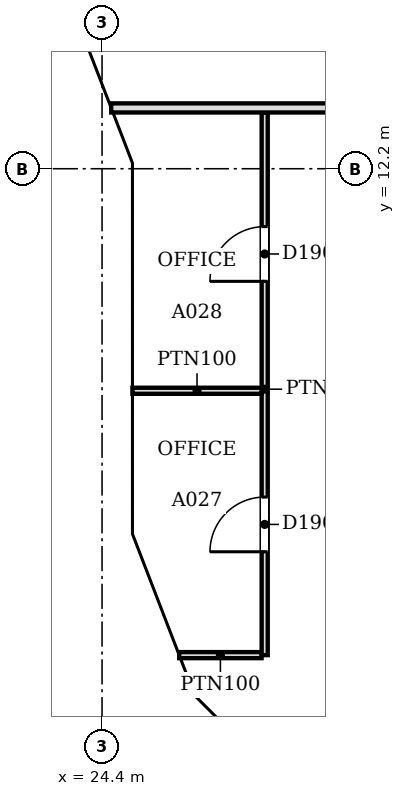
"""IFC4 building model, lengths in metres.
Left out: names, types, materials, properties, quantities, classifications, styles, units other than length and angle.
Written with IfcOpenShell. Run it as: python <this file> out.ifc"""

import sys

from ifc_helpers import new_model, si_unit, direction, frame, frame_2d, origin, place, context, subcontext, project, spatial, polyline, rectangle, outline, extrude, faceted_brep, source, transform, mapped, element, fill, save


model = new_model("IFC4")
c1 = context("Model", 3, precision=1e-05, world=origin(), true_north=direction((0.0, 1.0)))
c2 = subcontext(c1, "Body", "Model", "MODEL_VIEW")
j1 = project(units=[si_unit("LENGTHUNIT", "METRE"), si_unit("PLANEANGLEUNIT", "RADIAN")], contexts=[c1])
p1 = place(None, origin())
s1 = spatial("IfcSite", under=j1, at=p1, CompositionType="ELEMENT")
p2 = place(p1, origin())
s2 = spatial("IfcBuilding", under=s1, at=p2, CompositionType="ELEMENT")
p3 = place(p2, frame((0.0, 0.0, 72.4)))
s3 = spatial("IfcBuildingStorey", under=s2, at=p3, CompositionType="ELEMENT", Elevation=72.4)
m1 = source(origin(), c2, "Body", "Brep", [
    faceted_brep([(3.103, -0.25, 7.544), (0.053, -0.25, 3.864), (0.053, -0.25, 3.736), (3.103, -0.25, 0.056), (0.0, 0.25, 3.8), (3.149, 0.25, 7.6), (3.196, 0.25, 7.543), (3.196, 0.25, 0.057), (3.149, 0.25, 0.0), (3.149, -0.0, 0.0), (3.149, -0.0, 7.6), (0.0, 0.0, 3.8)], [[[0, 1, 2, 3]], [[4, 5, 6, 7, 8]], [[8, 7, 9]], [[6, 5, 10]], [[5, 4, 11, 1, 0, 10]], [[4, 8, 9, 3, 2, 11]], [[11, 2, 1]], [[3, 9, 7, 6, 10, 0]]]),
])
p4 = place(p3, frame((23.517, 15.185, -3.8), z_axis=(0.0, 0.0, 1.0), x_axis=(0.359864468756, -0.933004589553, 0.0)))
e1 = element("IfcWall", 1, at=p4, inside=s3, PredefinedType="SOLIDWALL", context=c2, shape_type="MappedRepresentation", body=[
    mapped(m1, transform((0.0, 0.0, 0.0), scale=1.0)),
])
m2 = source(origin(), c2, "Body", "SweptSolid", [
    extrude(outline(polyline([(2.949, 6.967), (0.325, 3.8), (2.949, 0.633), (2.949, 6.967)])), frame((0.0, 0.26, 0.0), z_axis=(0.0, -1.0, 0.0), x_axis=(1.0, 0.0, 0.0)), (0.0, 0.0, 1.0), 0.52),
])
p5 = place(p4, origin())
e2 = element("IfcOpeningElement", 2, at=p5, cuts=e1, PredefinedType="OPENING", context=c2, shape_type="MappedRepresentation", body=[
    mapped(m2, transform((0.0, 0.0, 0.0), scale=1.0)),
])
m3 = source(origin(), c2, "Body", "Brep", [
    faceted_brep([(0.093, -0.25, 0.057), (3.143, -0.25, 3.8), (0.093, -0.25, 7.543), (0.0, 0.25, 7.544), (0.047, 0.25, 7.6), (3.143, 0.25, 3.8), (0.047, 0.25, 0.0), (0.0, 0.25, 0.056), (0.047, 0.0, 0.0), (0.047, 0.0, 7.6)], [[[0, 1, 2]], [[3, 4, 5, 6, 7]], [[6, 5, 1, 0, 8]], [[5, 4, 9, 2, 1]], [[4, 3, 9]], [[7, 6, 8]], [[7, 8, 0, 2, 9, 3]]]),
])
p6 = place(p3, frame((24.65, 12.293, -3.8), z_axis=(0.0, 0.0, 1.0), x_axis=(0.0, -1.0, 0.0)))
e3 = element("IfcWall", 3, at=p6, inside=s3, PredefinedType="SOLIDWALL", context=c2, shape_type="MappedRepresentation", body=[
    mapped(m3, transform((0.0, 0.0, 0.0), scale=1.0)),
])
m4 = source(origin(), c2, "Body", "SweptSolid", [
    extrude(outline(polyline([(0.247, 0.641), (2.821, 3.8), (0.247, 6.959), (0.247, 0.641)])), frame((0.0, 0.26, 0.0), z_axis=(0.0, -1.0, 0.0), x_axis=(1.0, 0.0, 0.0)), (0.0, 0.0, 1.0), 0.52),
])
p7 = place(p6, origin())
e4 = element("IfcOpeningElement", 4, at=p7, cuts=e3, PredefinedType="OPENING", context=c2, shape_type="MappedRepresentation", body=[
    mapped(m4, transform((0.0, 0.0, 0.0), scale=1.0)),
])
m5 = source(origin(), c2, "Body", "Brep", [
    faceted_brep([(3.003, -0.25, 0.0), (3.05, -0.25, 0.06), (3.05, -0.25, 7.54), (3.003, -0.25, 7.6), (0.0, -0.25, 3.8), (0.0, 0.25, 3.8), (2.957, 0.25, 7.541), (2.957, 0.25, 0.059), (3.003, 0.0, 0.0), (3.003, 0.0, 7.6)], [[[0, 1, 2, 3, 4]], [[5, 6, 7]], [[1, 0, 8]], [[9, 3, 2]], [[6, 5, 4, 3, 9]], [[5, 7, 8, 0, 4]], [[1, 8, 7, 6, 9, 2]]]),
])
p8 = place(p3, frame((24.65, 9.15, -3.8), z_axis=(0.0, 0.0, 1.0), x_axis=(0.0, -1.0, 0.0)))
e5 = element("IfcWall", 5, at=p8, inside=s3, PredefinedType="SOLIDWALL", context=c2, shape_type="MappedRepresentation", body=[
    mapped(m5, transform((0.0, 0.0, 0.0), scale=1.0)),
])
m6 = source(origin(), c2, "Body", "SweptSolid", [
    extrude(outline(polyline([(2.803, 6.944), (0.319, 3.8), (2.803, 0.656), (2.803, 6.944)])), frame((0.0, 0.26, 0.0), z_axis=(0.0, -1.0, 0.0), x_axis=(1.0, 0.0, 0.0)), (0.0, 0.0, 1.0), 0.52),
])
p9 = place(p8, origin())
e6 = element("IfcOpeningElement", 6, at=p9, cuts=e5, PredefinedType="OPENING", context=c2, shape_type="MappedRepresentation", body=[
    mapped(m6, transform((0.0, 0.0, 0.0), scale=1.0)),
])
m7 = source(origin(), c2, "Body", "Brep", [
    faceted_brep([(0.047, -0.25, 0.0), (2.997, -0.25, 3.8), (0.047, -0.25, 7.6), (0.0, -0.25, 7.541), (0.0, -0.25, 0.059), (0.093, 0.25, 7.54), (2.944, 0.25, 3.868), (2.944, 0.25, 3.732), (0.093, 0.25, 0.06), (2.997, 0.0, 3.8), (0.047, 0.0, 0.0), (0.047, 0.0, 7.6)], [[[0, 1, 2, 3, 4]], [[5, 6, 7, 8]], [[8, 7, 9, 1, 0, 10]], [[6, 5, 11, 2, 1, 9]], [[3, 2, 11]], [[10, 0, 4]], [[8, 10, 4, 3, 11, 5]], [[9, 7, 6]]]),
])
p10 = place(p3, frame((24.633, 6.19, -3.8), z_axis=(0.0, 0.0, 1.0), x_axis=(0.359901446078, -0.932990326376, 0.0)))
e7 = element("IfcWall", 7, at=p10, inside=s3, PredefinedType="SOLIDWALL", context=c2, shape_type="MappedRepresentation", body=[
    mapped(m7, transform((0.0, 0.0, 0.0), scale=1.0)),
])
m8 = source(origin(), c2, "Body", "SweptSolid", [
    extrude(outline(polyline([(0.247, 0.665), (2.681, 3.8), (0.247, 6.935), (0.247, 0.665)])), frame((0.0, 0.26, 0.0), z_axis=(0.0, -1.0, 0.0), x_axis=(1.0, 0.0, 0.0)), (0.0, 0.0, 1.0), 0.52),
])
p11 = place(p10, origin())
e8 = element("IfcOpeningElement", 8, at=p11, cuts=e7, PredefinedType="OPENING", context=c2, shape_type="MappedRepresentation", body=[
    mapped(m8, transform((0.0, 0.0, 0.0), scale=1.0)),
])
m9 = source(origin(), c2, "Body", "Brep", [
    faceted_brep([(2.944, -0.25, 0.0), (2.997, -0.25, 0.068), (2.997, -0.25, 7.532), (2.944, -0.25, 7.6), (0.0, -0.25, 3.8), (0.053, 0.25, 3.868), (2.891, 0.25, 7.532), (2.891, 0.25, 0.068), (0.053, 0.25, 3.731), (2.944, 0.0, 0.0), (2.944, 0.0, 7.6), (0.0, 0.0, 3.8)], [[[0, 1, 2, 3, 4]], [[5, 6, 7, 8]], [[1, 0, 9]], [[10, 3, 2]], [[6, 5, 11, 4, 3, 10]], [[8, 7, 9, 0, 4, 11]], [[8, 11, 5]], [[1, 9, 7, 6, 10, 2]]]),
])
p12 = place(p3, frame((25.712, 3.394, -3.8), z_axis=(0.0, 0.0, 1.0), x_axis=(0.707066050402, -0.707147509625, 0.0)))
e9 = element("IfcWall", 9, at=p12, inside=s3, PredefinedType="SOLIDWALL", context=c2, shape_type="MappedRepresentation", body=[
    mapped(m9, transform((0.0, 0.0, 0.0), scale=1.0)),
])
m10 = source(origin(), c2, "Body", "SweptSolid", [
    extrude(outline(polyline([(2.744, 6.934), (0.316, 3.8), (2.744, 0.666), (2.744, 6.934)])), frame((0.0, 0.26, 0.0), z_axis=(0.0, -1.0, 0.0), x_axis=(1.0, 0.0, 0.0)), (0.0, 0.0, 1.0), 0.52),
])
p13 = place(p12, origin())
e10 = element("IfcOpeningElement", 10, at=p13, cuts=e9, PredefinedType="OPENING", context=c2, shape_type="MappedRepresentation", body=[
    mapped(m10, transform((0.0, 0.0, 0.0), scale=1.0)),
])
p14 = place(p2, frame((0.0, 0.0, 76.2)))
s4 = spatial("IfcBuildingStorey", under=s2, at=p14, CompositionType="ELEMENT", Elevation=76.2)
m11 = source(origin(), c2, "Body", "Brep", [
    faceted_brep([(0.106, -0.25, 0.064), (3.156, -0.25, 3.744), (3.156, -0.25, 3.856), (0.106, -0.25, 7.536), (0.0, 0.25, 7.536), (0.053, 0.25, 7.6), (3.202, 0.25, 3.8), (0.053, 0.25, 0.0), (0.0, 0.25, 0.064), (3.202, -0.0, 3.8), (0.053, 0.0, 0.0), (0.053, 0.0, 7.6)], [[[0, 1, 2, 3]], [[4, 5, 6, 7, 8]], [[7, 6, 9, 1, 0, 10]], [[6, 5, 11, 3, 2, 9]], [[5, 4, 11]], [[8, 7, 10]], [[8, 10, 0, 3, 11, 4]], [[1, 9, 2]]]),
])
p15 = place(p14, frame((23.497, 15.234, -3.8), z_axis=(0.0, 0.0, 1.0), x_axis=(0.359913782069, -0.932985567668, 0.0)))
e11 = element("IfcWall", 11, at=p15, inside=s4, PredefinedType="SOLIDWALL", context=c2, shape_type="MappedRepresentation", body=[
    mapped(m11, transform((0.0, 0.0, 0.0), scale=1.0)),
])
m12 = source(origin(), c2, "Body", "SweptSolid", [
    extrude(outline(polyline([(0.253, 0.633), (2.878, 3.8), (0.253, 6.967), (0.253, 0.633)])), frame((0.0, 0.26, 0.0), z_axis=(0.0, -1.0, 0.0), x_axis=(1.0, 0.0, 0.0)), (0.0, 0.0, 1.0), 0.52),
])
p16 = place(p15, origin())
e12 = element("IfcOpeningElement", 12, at=p16, cuts=e11, PredefinedType="OPENING", context=c2, shape_type="MappedRepresentation", body=[
    mapped(m12, transform((0.0, 0.0, 0.0), scale=1.0)),
])
m13 = source(origin(), c2, "Body", "Brep", [
    faceted_brep([(3.096, -0.25, 0.0), (6.1, -0.25, 3.8), (3.096, -0.25, 7.6), (0.047, -0.25, 3.857), (0.047, -0.25, 3.743), (0.0, 0.25, 3.8), (3.096, 0.25, 7.6), (6.053, 0.25, 3.859), (6.053, 0.25, 3.741), (3.096, 0.25, 0.0), (6.1, -0.0, 3.8), (0.0, 0.0, 3.8)], [[[0, 1, 2, 3, 4]], [[5, 6, 7, 8, 9]], [[9, 8, 10, 1, 0]], [[7, 6, 2, 1, 10]], [[6, 5, 11, 3, 2]], [[5, 9, 0, 4, 11]], [[11, 4, 3]], [[10, 8, 7]]]),
])
p17 = place(p14, frame((24.65, 12.247, -3.8), z_axis=(0.0, 0.0, 1.0), x_axis=(0.0, -1.0, 0.0)))
e13 = element("IfcWall", 13, at=p17, inside=s4, PredefinedType="SOLIDWALL", context=c2, shape_type="MappedRepresentation", body=[
    mapped(m13, transform((0.0, 0.0, 0.0), scale=1.0)),
])
m14 = source(origin(), c2, "Body", "SweptSolid", [
    extrude(outline(polyline([(3.094, 0.399), (5.781, 3.8), (3.094, 7.201), (0.323, 3.8), (3.094, 0.399)])), frame((0.0, 0.26, 0.0), z_axis=(0.0, -1.0, 0.0), x_axis=(1.0, 0.0, 0.0)), (0.0, 0.0, 1.0), 0.52),
])
p18 = place(p17, origin())
e14 = element("IfcOpeningElement", 14, at=p18, cuts=e13, PredefinedType="OPENING", context=c2, shape_type="MappedRepresentation", body=[
    mapped(m14, transform((0.0, 0.0, 0.0), scale=1.0)),
])
m15 = source(origin(), c2, "Body", "Brep", [
    faceted_brep([(2.95, -0.25, 0.0), (3.003, -0.25, 0.068), (3.003, -0.25, 7.532), (2.95, -0.25, 7.6), (0.0, -0.25, 3.8), (0.047, 0.25, 3.86), (2.898, 0.25, 7.532), (2.898, 0.25, 0.068), (0.047, 0.25, 3.74), (2.95, 0.0, 0.0), (2.95, 0.0, 7.6), (0.0, 0.0, 3.8)], [[[0, 1, 2, 3, 4]], [[5, 6, 7, 8]], [[1, 0, 9]], [[10, 3, 2]], [[6, 5, 11, 4, 3, 10]], [[8, 7, 9, 0, 4, 11]], [[8, 11, 5]], [[1, 9, 7, 6, 10, 2]]]),
])
p19 = place(p14, frame((24.65, 6.146, -3.8), z_axis=(0.0, 0.0, 1.0), x_axis=(0.359953949349, -0.932970071518, 0.0)))
e15 = element("IfcWall", 15, at=p19, inside=s4, PredefinedType="SOLIDWALL", context=c2, shape_type="MappedRepresentation", body=[
    mapped(m15, transform((0.0, 0.0, 0.0), scale=1.0)),
])
m16 = source(origin(), c2, "Body", "SweptSolid", [
    extrude(outline(polyline([(2.75, 6.935), (0.316, 3.8), (2.75, 0.665), (2.75, 6.935)])), frame((0.0, 0.26, 0.0), z_axis=(0.0, -1.0, 0.0), x_axis=(1.0, 0.0, 0.0)), (0.0, 0.0, 1.0), 0.52),
])
p20 = place(p19, origin())
e16 = element("IfcOpeningElement", 16, at=p20, cuts=e15, PredefinedType="OPENING", context=c2, shape_type="MappedRepresentation", body=[
    mapped(m16, transform((0.0, 0.0, 0.0), scale=1.0)),
])
m17 = source(origin(), c2, "Body", "Brep", [
    faceted_brep([(0.053, -0.25, 0.0), (2.997, -0.25, 3.8), (0.053, -0.25, 7.6), (0.0, -0.25, 7.532), (0.0, -0.25, 0.068), (0.106, 0.25, 7.532), (2.944, 0.25, 3.868), (2.944, 0.25, 3.732), (0.106, 0.25, 0.068), (2.997, 0.0, 3.8), (0.053, 0.0, 0.0), (0.053, 0.0, 7.6)], [[[0, 1, 2, 3, 4]], [[5, 6, 7, 8]], [[8, 7, 9, 1, 0, 10]], [[6, 5, 11, 2, 1, 9]], [[3, 2, 11]], [[10, 0, 4]], [[8, 10, 4, 3, 11, 5]], [[9, 7, 6]]]),
])
p21 = place(p14, frame((25.675, 3.431, -3.8), z_axis=(0.0, 0.0, 1.0), x_axis=(0.707106781187, -0.707106781187, 0.0)))
e17 = element("IfcWall", 17, at=p21, inside=s4, PredefinedType="SOLIDWALL", context=c2, shape_type="MappedRepresentation", body=[
    mapped(m17, transform((0.0, 0.0, 0.0), scale=1.0)),
])
m18 = source(origin(), c2, "Body", "SweptSolid", [
    extrude(outline(polyline([(0.253, 0.667), (2.681, 3.8), (0.253, 6.934), (0.253, 0.667)])), frame((0.0, 0.26, 0.0), z_axis=(0.0, -1.0, 0.0), x_axis=(1.0, 0.0, 0.0)), (0.0, 0.0, 1.0), 0.52),
])
p22 = place(p21, origin())
e18 = element("IfcOpeningElement", 18, at=p22, cuts=e17, PredefinedType="OPENING", context=c2, shape_type="MappedRepresentation", body=[
    mapped(m18, transform((0.0, 0.0, 0.0), scale=1.0)),
])
p23 = place(p3, frame((25.669, 4.2, 0.0), z_axis=(0.0, 0.0, 1.0), x_axis=(1.0, 0.0, 0.0)))
e19 = element("IfcWall", 19, at=p23, inside=s3, PredefinedType="PARTITIONING", context=c2, shape_type="SweptSolid", body=[
    extrude(rectangle(XDim=1.355, YDim=0.1, at=frame_2d((0.678, 0.0))), origin(), (0.0, 0.0, 1.0), 3.067),
])
p24 = place(p3, frame((27.075, 4.2, 0.0), z_axis=(0.0, 0.0, 1.0), x_axis=(0.0, 1.0, 0.0)))
e20 = element("IfcWall", 20, at=p24, inside=s3, PredefinedType="PARTITIONING", context=c2, shape_type="SweptSolid", body=[
    extrude(rectangle(XDim=8.924, YDim=0.1, at=frame_2d((4.462, 0.0))), origin(), (0.0, 0.0, 1.0), 3.067),
])
m19 = source(origin(), c2, "Body", "SweptSolid", [
    extrude(rectangle(XDim=0.9, YDim=2.1, at=frame_2d((0.45, 1.05))), frame((0.0, 0.06, 0.0), z_axis=(0.0, -1.0, 0.0), x_axis=(1.0, 0.0, 0.0)), (0.0, 0.0, 1.0), 0.12),
])
p25 = place(p24, frame((6.148, 0.0, 0.0)))
e21 = element("IfcOpeningElement", 21, at=p25, cuts=e20, PredefinedType="OPENING", context=c2, shape_type="MappedRepresentation", body=[
    mapped(m19, transform((0.0, 0.0, 0.0), scale=1.0)),
])
p26 = place(p24, frame((1.7, 0.0, 0.0)))
e22 = element("IfcOpeningElement", 22, at=p26, cuts=e20, PredefinedType="OPENING", context=c2, shape_type="MappedRepresentation", body=[
    mapped(m19, transform((0.0, 0.0, 0.0), scale=1.0)),
])
p27 = place(p3, frame((24.9, 8.548, 0.0), z_axis=(0.0, 0.0, 1.0), x_axis=(1.0, 0.0, 0.0)))
e23 = element("IfcWall", 23, at=p27, inside=s3, PredefinedType="PARTITIONING", context=c2, shape_type="SweptSolid", body=[
    extrude(rectangle(XDim=2.124, YDim=0.1, at=frame_2d((1.062, 0.0))), origin(), (0.0, 0.0, 1.0), 3.067),
])
p28 = place(p3, frame((24.55, 13.2, 0.0), z_axis=(0.0, 0.0, 1.0), x_axis=(1.0, 0.0, 0.0)))
e24 = element("IfcWall", 24, at=p28, inside=s3, PredefinedType="PARTITIONING", context=c2, shape_type="SweptSolid", body=[
    extrude(rectangle(XDim=20.374, YDim=0.15, at=frame_2d((10.187, 0.0))), origin(), (0.0, 0.0, 1.0), 3.067),
])
m20 = source(origin(), c2, "Body", "SweptSolid", [
    extrude(rectangle(XDim=0.9, YDim=2.1, at=frame_2d((0.45, 1.05))), frame((0.0, 0.025, 0.0), z_axis=(0.0, -1.0, 0.0), x_axis=(1.0, 0.0, 0.0)), (0.0, 0.0, 1.0), 0.05),
])
p29 = place(p25, origin())
e25 = element("IfcDoor", 25, at=p29, inside=s3, OperationType="SINGLE_SWING_LEFT", PredefinedType="DOOR", context=c2, shape_type="MappedRepresentation", body=[
    mapped(m20, transform((0.0, 0.0, 0.0), scale=1.0)),
])
fill(e21, e25)
p30 = place(p26, origin())
e26 = element("IfcDoor", 26, at=p30, inside=s3, OperationType="SINGLE_SWING_LEFT", PredefinedType="DOOR", context=c2, shape_type="MappedRepresentation", body=[
    mapped(m20, transform((0.0, 0.0, 0.0), scale=1.0)),
])
fill(e22, e26)
save(model, sys.argv[1])
